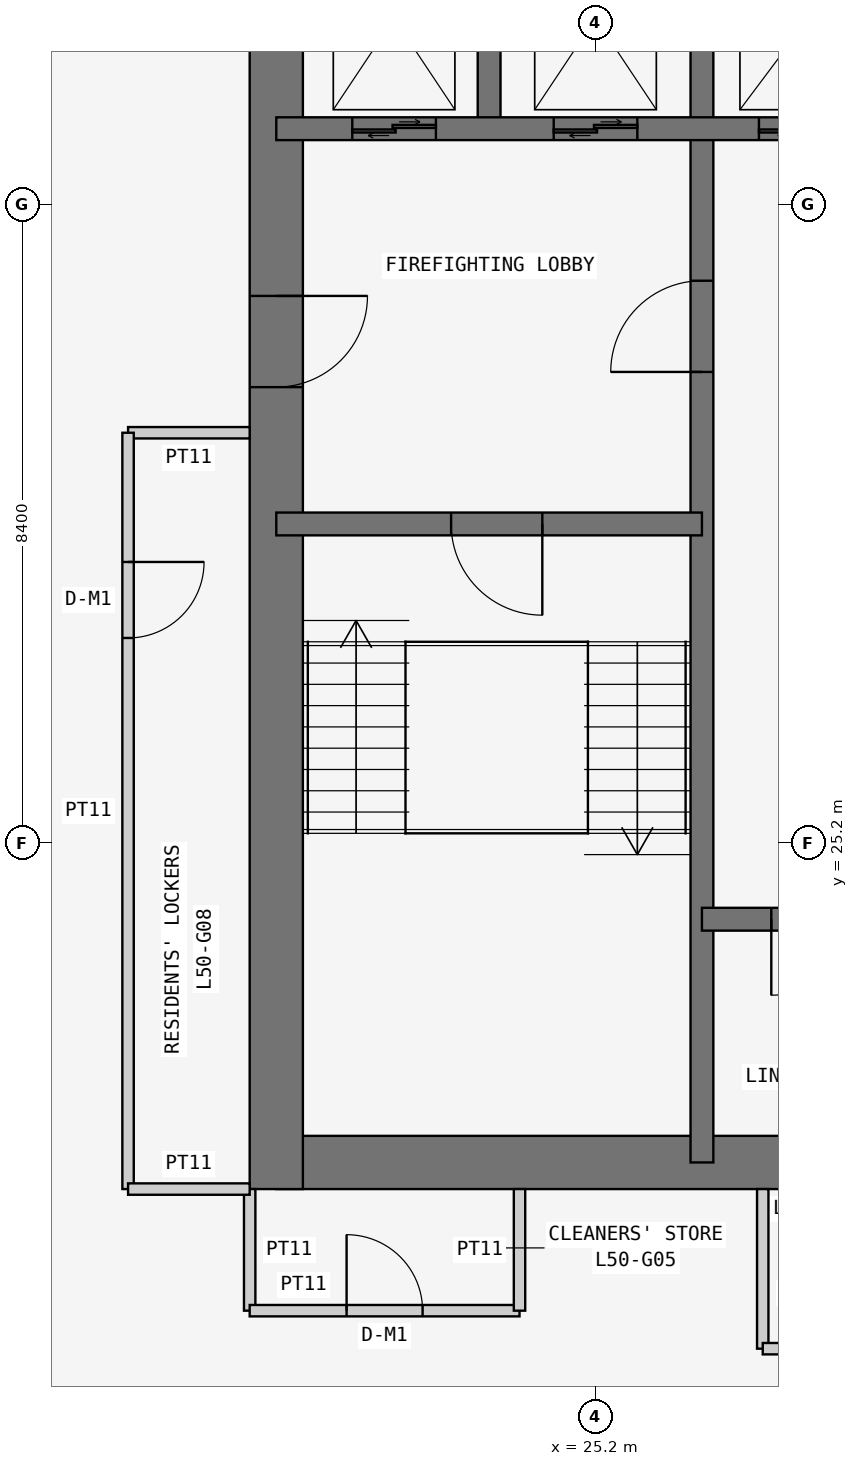
"""IFC4 building model, lengths in metres.
Left out: names, types, materials, properties, quantities, classifications, styles, units other than length and angle.
Written with IfcOpenShell. Run it as: python <this file> out.ifc"""

import sys

from ifc_helpers import new_model, si_unit, direction, frame, frame_2d, origin, place, context, subcontext, project, spatial, rectangle, extrude, element, fill, save


model = new_model("IFC4")
c1 = context("Model", 3, precision=1e-05, world=origin(), true_north=direction((0.0, 1.0)))
c2 = subcontext(c1, "Body", "Model", "MODEL_VIEW")
j1 = project(units=[si_unit("LENGTHUNIT", "METRE"), si_unit("PLANEANGLEUNIT", "RADIAN")], contexts=[c1])
p1 = place(None, origin())
s1 = spatial("IfcSite", under=j1, at=p1, CompositionType="ELEMENT")
p2 = place(p1, origin())
s2 = spatial("IfcBuilding", under=s1, at=p2, CompositionType="ELEMENT")
p3 = place(p2, frame((0.0, 0.0, 194.1)))
s3 = spatial("IfcBuildingStorey", under=s2, at=p3, CompositionType="ELEMENT", Elevation=194.1)
p4 = place(p3, frame((21.0, 21.0, 0.0), z_axis=(0.0, 0.0, 1.0), x_axis=(1.0, 0.0, 0.0)))
e1 = element("IfcWall", 1, at=p4, inside=s3, PredefinedType="SHEAR", context=c2, shape_type="SweptSolid", body=[
    extrude(rectangle(XDim=17.15, YDim=0.7, at=frame_2d((8.575, 0.0))), origin(), (0.0, 0.0, 1.0), 3.6),
])
p5 = place(p3, frame((21.0, 37.8, 0.0), z_axis=(0.0, 0.0, 1.0), x_axis=(0.0, -1.0, 0.0)))
e2 = element("IfcWall", 2, at=p5, inside=s3, PredefinedType="SHEAR", context=c2, shape_type="SweptSolid", body=[
    extrude(rectangle(XDim=17.15, YDim=0.7, at=frame_2d((8.575, 0.0))), origin(), (0.0, 0.0, 1.0), 3.6),
])
p6 = place(p5, frame((5.4, 0.0, 0.0)))
e3 = element("IfcOpeningElement", 3, at=p6, cuts=e2, PredefinedType="OPENING", context=c2, shape_type="SweptSolid", body=[
    extrude(rectangle(XDim=1.2, YDim=2.1, at=frame_2d((0.6, 1.05))), frame((0.0, 0.36, 0.0), z_axis=(0.0, -1.0, 0.0), x_axis=(1.0, 0.0, 0.0)), (0.0, 0.0, 1.0), 0.72),
])
p7 = place(p3, frame((26.6, 21.0, 0.0), z_axis=(0.0, 0.0, 1.0), x_axis=(0.0, 1.0, 0.0)))
e4 = element("IfcWall", 4, at=p7, inside=s3, PredefinedType="SHEAR", context=c2, shape_type="SweptSolid", body=[
    extrude(rectangle(XDim=16.8, YDim=0.3, at=frame_2d((8.4, 0.0))), origin(), (0.0, 0.0, 1.0), 3.6),
])
p8 = place(p7, frame((10.4, 0.0, 0.0)))
e5 = element("IfcOpeningElement", 5, at=p8, cuts=e4, PredefinedType="OPENING", context=c2, shape_type="SweptSolid", body=[
    extrude(rectangle(XDim=1.2, YDim=2.1, at=frame_2d((0.6, 1.05))), frame((0.0, 0.16, 0.0), z_axis=(0.0, -1.0, 0.0), x_axis=(1.0, 0.0, 0.0)), (0.0, 0.0, 1.0), 0.32),
])
p9 = place(p3, frame((21.0, 29.4, 0.0), z_axis=(0.0, 0.0, 1.0), x_axis=(1.0, 0.0, 0.0)))
e6 = element("IfcWall", 6, at=p9, inside=s3, PredefinedType="SHEAR", context=c2, shape_type="SweptSolid", body=[
    extrude(rectangle(XDim=5.6, YDim=0.3, at=frame_2d((2.8, 0.0))), origin(), (0.0, 0.0, 1.0), 3.6),
])
p10 = place(p9, frame((2.3, 0.0, 0.0)))
e7 = element("IfcOpeningElement", 7, at=p10, cuts=e6, PredefinedType="OPENING", context=c2, shape_type="SweptSolid", body=[
    extrude(rectangle(XDim=1.2, YDim=2.1, at=frame_2d((0.6, 1.05))), frame((0.0, 0.16, 0.0), z_axis=(0.0, -1.0, 0.0), x_axis=(1.0, 0.0, 0.0)), (0.0, 0.0, 1.0), 0.32),
])
p11 = place(p3, frame((21.0, 34.6, 0.0), z_axis=(0.0, 0.0, 1.0), x_axis=(1.0, 0.0, 0.0)))
e8 = element("IfcWall", 8, at=p11, inside=s3, PredefinedType="SHEAR", context=c2, shape_type="SweptSolid", body=[
    extrude(rectangle(XDim=11.2, YDim=0.3, at=frame_2d((5.6, 0.0))), origin(), (0.0, 0.0, 1.0), 3.6),
])
p12 = place(p11, frame((9.25, 0.0, 0.0)))
e9 = element("IfcOpeningElement", 9, at=p12, cuts=e8, PredefinedType="OPENING", context=c2, shape_type="SweptSolid", body=[
    extrude(rectangle(XDim=1.1, YDim=2.1, at=frame_2d((0.55, 1.05))), frame((0.0, 0.16, 0.0), z_axis=(0.0, -1.0, 0.0), x_axis=(1.0, 0.0, 0.0)), (0.0, 0.0, 1.0), 0.32),
])
p13 = place(p11, frame((1.0, 0.0, 0.0)))
e10 = element("IfcOpeningElement", 10, at=p13, cuts=e8, PredefinedType="OPENING", context=c2, shape_type="SweptSolid", body=[
    extrude(rectangle(XDim=1.1, YDim=2.1, at=frame_2d((0.55, 1.05))), frame((0.0, 0.16, 0.0), z_axis=(0.0, -1.0, 0.0), x_axis=(1.0, 0.0, 0.0)), (0.0, 0.0, 1.0), 0.32),
])
p14 = place(p11, frame((3.65, 0.0, 0.0)))
e11 = element("IfcOpeningElement", 11, at=p14, cuts=e8, PredefinedType="OPENING", context=c2, shape_type="SweptSolid", body=[
    extrude(rectangle(XDim=1.1, YDim=2.1, at=frame_2d((0.55, 1.05))), frame((0.0, 0.16, 0.0), z_axis=(0.0, -1.0, 0.0), x_axis=(1.0, 0.0, 0.0)), (0.0, 0.0, 1.0), 0.32),
])
p15 = place(p11, frame((6.35, 0.0, 0.0)))
e12 = element("IfcOpeningElement", 12, at=p15, cuts=e8, PredefinedType="OPENING", context=c2, shape_type="SweptSolid", body=[
    extrude(rectangle(XDim=1.3, YDim=2.1, at=frame_2d((0.65, 1.05))), frame((0.0, 0.16, 0.0), z_axis=(0.0, -1.0, 0.0), x_axis=(1.0, 0.0, 0.0)), (0.0, 0.0, 1.0), 0.32),
])
p16 = place(p3, frame((23.8, 34.6, 0.0), z_axis=(0.0, 0.0, 1.0), x_axis=(0.0, 1.0, 0.0)))
e13 = element("IfcWall", 13, at=p16, inside=s3, PredefinedType="SHEAR", context=c2, shape_type="SweptSolid", body=[
    extrude(rectangle(XDim=3.2, YDim=0.3, at=frame_2d((1.6, 0.0))), origin(), (0.0, 0.0, 1.0), 3.6),
])
p17 = place(p3, frame((26.6, 24.2, 0.0), z_axis=(0.0, 0.0, 1.0), x_axis=(1.0, 0.0, 0.0)))
e14 = element("IfcWall", 14, at=p17, inside=s3, PredefinedType="SHEAR", context=c2, shape_type="SweptSolid", body=[
    extrude(rectangle(XDim=11.2, YDim=0.3, at=frame_2d((5.6, 0.0))), origin(), (0.0, 0.0, 1.0), 3.6),
])
p18 = place(p17, frame((0.913, 0.0, 0.0)))
e15 = element("IfcOpeningElement", 15, at=p18, cuts=e14, PredefinedType="OPENING", context=c2, shape_type="SweptSolid", body=[
    extrude(rectangle(XDim=1.0, YDim=2.1, at=frame_2d((0.5, 1.05))), frame((0.0, 0.16, 0.0), z_axis=(0.0, -1.0, 0.0), x_axis=(1.0, 0.0, 0.0)), (0.0, 0.0, 1.0), 0.32),
])
p19 = place(p17, frame((3.75, 0.0, 0.0)))
e16 = element("IfcOpeningElement", 16, at=p19, cuts=e14, PredefinedType="OPENING", context=c2, shape_type="SweptSolid", body=[
    extrude(rectangle(XDim=0.9, YDim=2.1, at=frame_2d((0.45, 1.05))), frame((0.0, 0.16, 0.0), z_axis=(0.0, -1.0, 0.0), x_axis=(1.0, 0.0, 0.0)), (0.0, 0.0, 1.0), 0.32),
])
p20 = place(p17, frame((6.45, 0.0, 0.0)))
e17 = element("IfcOpeningElement", 17, at=p20, cuts=e14, PredefinedType="OPENING", context=c2, shape_type="SweptSolid", body=[
    extrude(rectangle(XDim=1.1, YDim=2.1, at=frame_2d((0.55, 1.05))), frame((0.0, 0.16, 0.0), z_axis=(0.0, -1.0, 0.0), x_axis=(1.0, 0.0, 0.0)), (0.0, 0.0, 1.0), 0.32),
])
p21 = place(p17, frame((9.1, 0.0, 0.0)))
e18 = element("IfcOpeningElement", 18, at=p21, cuts=e14, PredefinedType="OPENING", context=c2, shape_type="SweptSolid", body=[
    extrude(rectangle(XDim=1.1, YDim=2.1, at=frame_2d((0.55, 1.05))), frame((0.0, 0.16, 0.0), z_axis=(0.0, -1.0, 0.0), x_axis=(1.0, 0.0, 0.0)), (0.0, 0.0, 1.0), 0.32),
])
p22 = place(p3, frame((20.65, 20.65, 0.0), z_axis=(0.0, 0.0, 1.0), x_axis=(0.0, -1.0, 0.0)))
e19 = element("IfcWall", 19, at=p22, inside=s3, PredefinedType="PARTITIONING", context=c2, shape_type="SweptSolid", body=[
    extrude(rectangle(XDim=1.6, YDim=0.15, at=frame_2d((0.8, 0.0))), origin(), (0.0, 0.0, 1.0), 3.45),
])
p23 = place(p3, frame((20.65, 19.05, 0.0), z_axis=(0.0, 0.0, 1.0), x_axis=(1.0, 0.0, 0.0)))
e20 = element("IfcWall", 20, at=p23, inside=s3, PredefinedType="PARTITIONING", context=c2, shape_type="SweptSolid", body=[
    extrude(rectangle(XDim=3.55, YDim=0.15, at=frame_2d((1.775, 0.0))), origin(), (0.0, 0.0, 1.0), 3.45),
])
p24 = place(p23, frame((1.275, 0.0, 0.0)))
e21 = element("IfcOpeningElement", 21, at=p24, cuts=e20, PredefinedType="OPENING", context=c2, shape_type="SweptSolid", body=[
    extrude(rectangle(XDim=1.0, YDim=2.1, at=frame_2d((0.5, 1.05))), frame((0.0, 0.085, 0.0), z_axis=(0.0, -1.0, 0.0), x_axis=(1.0, 0.0, 0.0)), (0.0, 0.0, 1.0), 0.17),
])
p25 = place(p3, frame((24.2, 19.05, 0.0), z_axis=(0.0, 0.0, 1.0), x_axis=(0.0, 1.0, 0.0)))
e22 = element("IfcWall", 22, at=p25, inside=s3, PredefinedType="PARTITIONING", context=c2, shape_type="SweptSolid", body=[
    extrude(rectangle(XDim=1.6, YDim=0.15, at=frame_2d((0.8, 0.0))), origin(), (0.0, 0.0, 1.0), 3.45),
])
p26 = place(p3, frame((27.4, 20.65, 0.0), z_axis=(0.0, 0.0, 1.0), x_axis=(0.0, -1.0, 0.0)))
e23 = element("IfcWall", 23, at=p26, inside=s3, PredefinedType="PARTITIONING", context=c2, shape_type="SweptSolid", body=[
    extrude(rectangle(XDim=2.1, YDim=0.15, at=frame_2d((1.05, 0.0))), origin(), (0.0, 0.0, 1.0), 3.45),
])
p27 = place(p3, frame((27.4, 18.55, 0.0), z_axis=(0.0, 0.0, 1.0), x_axis=(1.0, 0.0, 0.0)))
e24 = element("IfcWall", 24, at=p27, inside=s3, PredefinedType="PARTITIONING", context=c2, shape_type="SweptSolid", body=[
    extrude(rectangle(XDim=4.0, YDim=0.15, at=frame_2d((2.0, 0.0))), origin(), (0.0, 0.0, 1.0), 3.45),
])
p28 = place(p27, frame((1.5, 0.0, 0.0)))
e25 = element("IfcOpeningElement", 25, at=p28, cuts=e24, PredefinedType="OPENING", context=c2, shape_type="SweptSolid", body=[
    extrude(rectangle(XDim=1.0, YDim=2.1, at=frame_2d((0.5, 1.05))), frame((0.0, 0.085, 0.0), z_axis=(0.0, -1.0, 0.0), x_axis=(1.0, 0.0, 0.0)), (0.0, 0.0, 1.0), 0.17),
])
p29 = place(p3, frame((20.65, 30.6, 0.0), z_axis=(0.0, 0.0, 1.0), x_axis=(-1.0, 0.0, 0.0)))
e26 = element("IfcWall", 26, at=p29, inside=s3, PredefinedType="PARTITIONING", context=c2, shape_type="SweptSolid", body=[
    extrude(rectangle(XDim=1.6, YDim=0.15, at=frame_2d((0.8, 0.0))), origin(), (0.0, 0.0, 1.0), 3.45),
])
p30 = place(p3, frame((19.05, 30.6, 0.0), z_axis=(0.0, 0.0, 1.0), x_axis=(0.0, -1.0, 0.0)))
e27 = element("IfcWall", 27, at=p30, inside=s3, PredefinedType="PARTITIONING", context=c2, shape_type="SweptSolid", body=[
    extrude(rectangle(XDim=9.95, YDim=0.15, at=frame_2d((4.975, 0.0))), origin(), (0.0, 0.0, 1.0), 3.45),
])
p31 = place(p30, frame((1.7, 0.0, 0.0)))
e28 = element("IfcOpeningElement", 28, at=p31, cuts=e27, PredefinedType="OPENING", context=c2, shape_type="SweptSolid", body=[
    extrude(rectangle(XDim=1.0, YDim=2.1, at=frame_2d((0.5, 1.05))), frame((0.0, 0.085, 0.0), z_axis=(0.0, -1.0, 0.0), x_axis=(1.0, 0.0, 0.0)), (0.0, 0.0, 1.0), 0.17),
])
p32 = place(p3, frame((19.05, 20.65, 0.0), z_axis=(0.0, 0.0, 1.0), x_axis=(1.0, 0.0, 0.0)))
e29 = element("IfcWall", 29, at=p32, inside=s3, PredefinedType="PARTITIONING", context=c2, shape_type="SweptSolid", body=[
    extrude(rectangle(XDim=1.6, YDim=0.15, at=frame_2d((0.8, 0.0))), origin(), (0.0, 0.0, 1.0), 3.45),
])
p33 = place(p24, origin())
e30 = element("IfcDoor", 30, at=p33, inside=s3, OperationType="SINGLE_SWING_LEFT", PredefinedType="DOOR", context=c2, shape_type="SweptSolid", body=[
    extrude(rectangle(XDim=1.0, YDim=2.1, at=frame_2d((0.5, 1.05))), frame((0.0, 0.025, 0.0), z_axis=(0.0, -1.0, 0.0), x_axis=(1.0, 0.0, 0.0)), (0.0, 0.0, 1.0), 0.05),
])
fill(e21, e30)
p34 = place(p31, origin())
e31 = element("IfcDoor", 31, at=p34, inside=s3, OperationType="SINGLE_SWING_LEFT", PredefinedType="DOOR", context=c2, shape_type="SweptSolid", body=[
    extrude(rectangle(XDim=1.0, YDim=2.1, at=frame_2d((0.5, 1.05))), frame((0.0, 0.025, 0.0), z_axis=(0.0, -1.0, 0.0), x_axis=(1.0, 0.0, 0.0)), (0.0, 0.0, 1.0), 0.05),
])
fill(e28, e31)
p35 = place(p6, origin())
e32 = element("IfcDoor", 32, at=p35, inside=s3, OperationType="SINGLE_SWING_LEFT", PredefinedType="DOOR", context=c2, shape_type="SweptSolid", body=[
    extrude(rectangle(XDim=1.2, YDim=2.1, at=frame_2d((0.6, 1.05))), frame((0.0, 0.025, 0.0), z_axis=(0.0, -1.0, 0.0), x_axis=(1.0, 0.0, 0.0)), (0.0, 0.0, 1.0), 0.05),
])
fill(e3, e32)
p36 = place(p10, frame((1.2, 0.0, 0.0), z_axis=(0.0, 0.0, 1.0), x_axis=(-1.0, 0.0, 0.0)))
e33 = element("IfcDoor", 33, at=p36, inside=s3, OperationType="SINGLE_SWING_LEFT", PredefinedType="DOOR", context=c2, shape_type="SweptSolid", body=[
    extrude(rectangle(XDim=1.2, YDim=2.1, at=frame_2d((0.6, 1.05))), frame((0.0, 0.025, 0.0), z_axis=(0.0, -1.0, 0.0), x_axis=(1.0, 0.0, 0.0)), (0.0, 0.0, 1.0), 0.05),
])
fill(e7, e33)
p37 = place(p8, origin())
e34 = element("IfcDoor", 34, at=p37, inside=s3, OperationType="SINGLE_SWING_LEFT", PredefinedType="DOOR", context=c2, shape_type="SweptSolid", body=[
    extrude(rectangle(XDim=1.2, YDim=2.1, at=frame_2d((0.6, 1.05))), frame((0.0, 0.025, 0.0), z_axis=(0.0, -1.0, 0.0), x_axis=(1.0, 0.0, 0.0)), (0.0, 0.0, 1.0), 0.05),
])
fill(e5, e34)
p38 = place(p18, frame((1.0, 0.0, 0.0), z_axis=(0.0, 0.0, 1.0), x_axis=(-1.0, 0.0, 0.0)))
e35 = element("IfcDoor", 35, at=p38, inside=s3, OperationType="SINGLE_SWING_RIGHT", PredefinedType="DOOR", context=c2, shape_type="SweptSolid", body=[
    extrude(rectangle(XDim=1.0, YDim=2.1, at=frame_2d((0.5, 1.05))), frame((0.0, 0.025, 0.0), z_axis=(0.0, -1.0, 0.0), x_axis=(1.0, 0.0, 0.0)), (0.0, 0.0, 1.0), 0.05),
])
fill(e15, e35)
p39 = place(p13, origin())
e36 = element("IfcDoor", 36, at=p39, inside=s3, OperationType="DOUBLE_DOOR_SLIDING", PredefinedType="DOOR", context=c2, shape_type="SweptSolid", body=[
    extrude(rectangle(XDim=1.1, YDim=2.1, at=frame_2d((0.55, 1.05))), frame((0.0, 0.025, 0.0), z_axis=(0.0, -1.0, 0.0), x_axis=(1.0, 0.0, 0.0)), (0.0, 0.0, 1.0), 0.05),
])
fill(e10, e36)
p40 = place(p14, origin())
e37 = element("IfcDoor", 37, at=p40, inside=s3, OperationType="DOUBLE_DOOR_SLIDING", PredefinedType="DOOR", context=c2, shape_type="SweptSolid", body=[
    extrude(rectangle(XDim=1.1, YDim=2.1, at=frame_2d((0.55, 1.05))), frame((0.0, 0.025, 0.0), z_axis=(0.0, -1.0, 0.0), x_axis=(1.0, 0.0, 0.0)), (0.0, 0.0, 1.0), 0.05),
])
fill(e11, e37)
p41 = place(p15, origin())
e38 = element("IfcDoor", 38, at=p41, inside=s3, OperationType="DOUBLE_DOOR_SLIDING", PredefinedType="DOOR", context=c2, shape_type="SweptSolid", body=[
    extrude(rectangle(XDim=1.3, YDim=2.1, at=frame_2d((0.65, 1.05))), frame((0.0, 0.025, 0.0), z_axis=(0.0, -1.0, 0.0), x_axis=(1.0, 0.0, 0.0)), (0.0, 0.0, 1.0), 0.05),
])
fill(e12, e38)
save(model, sys.argv[1])
